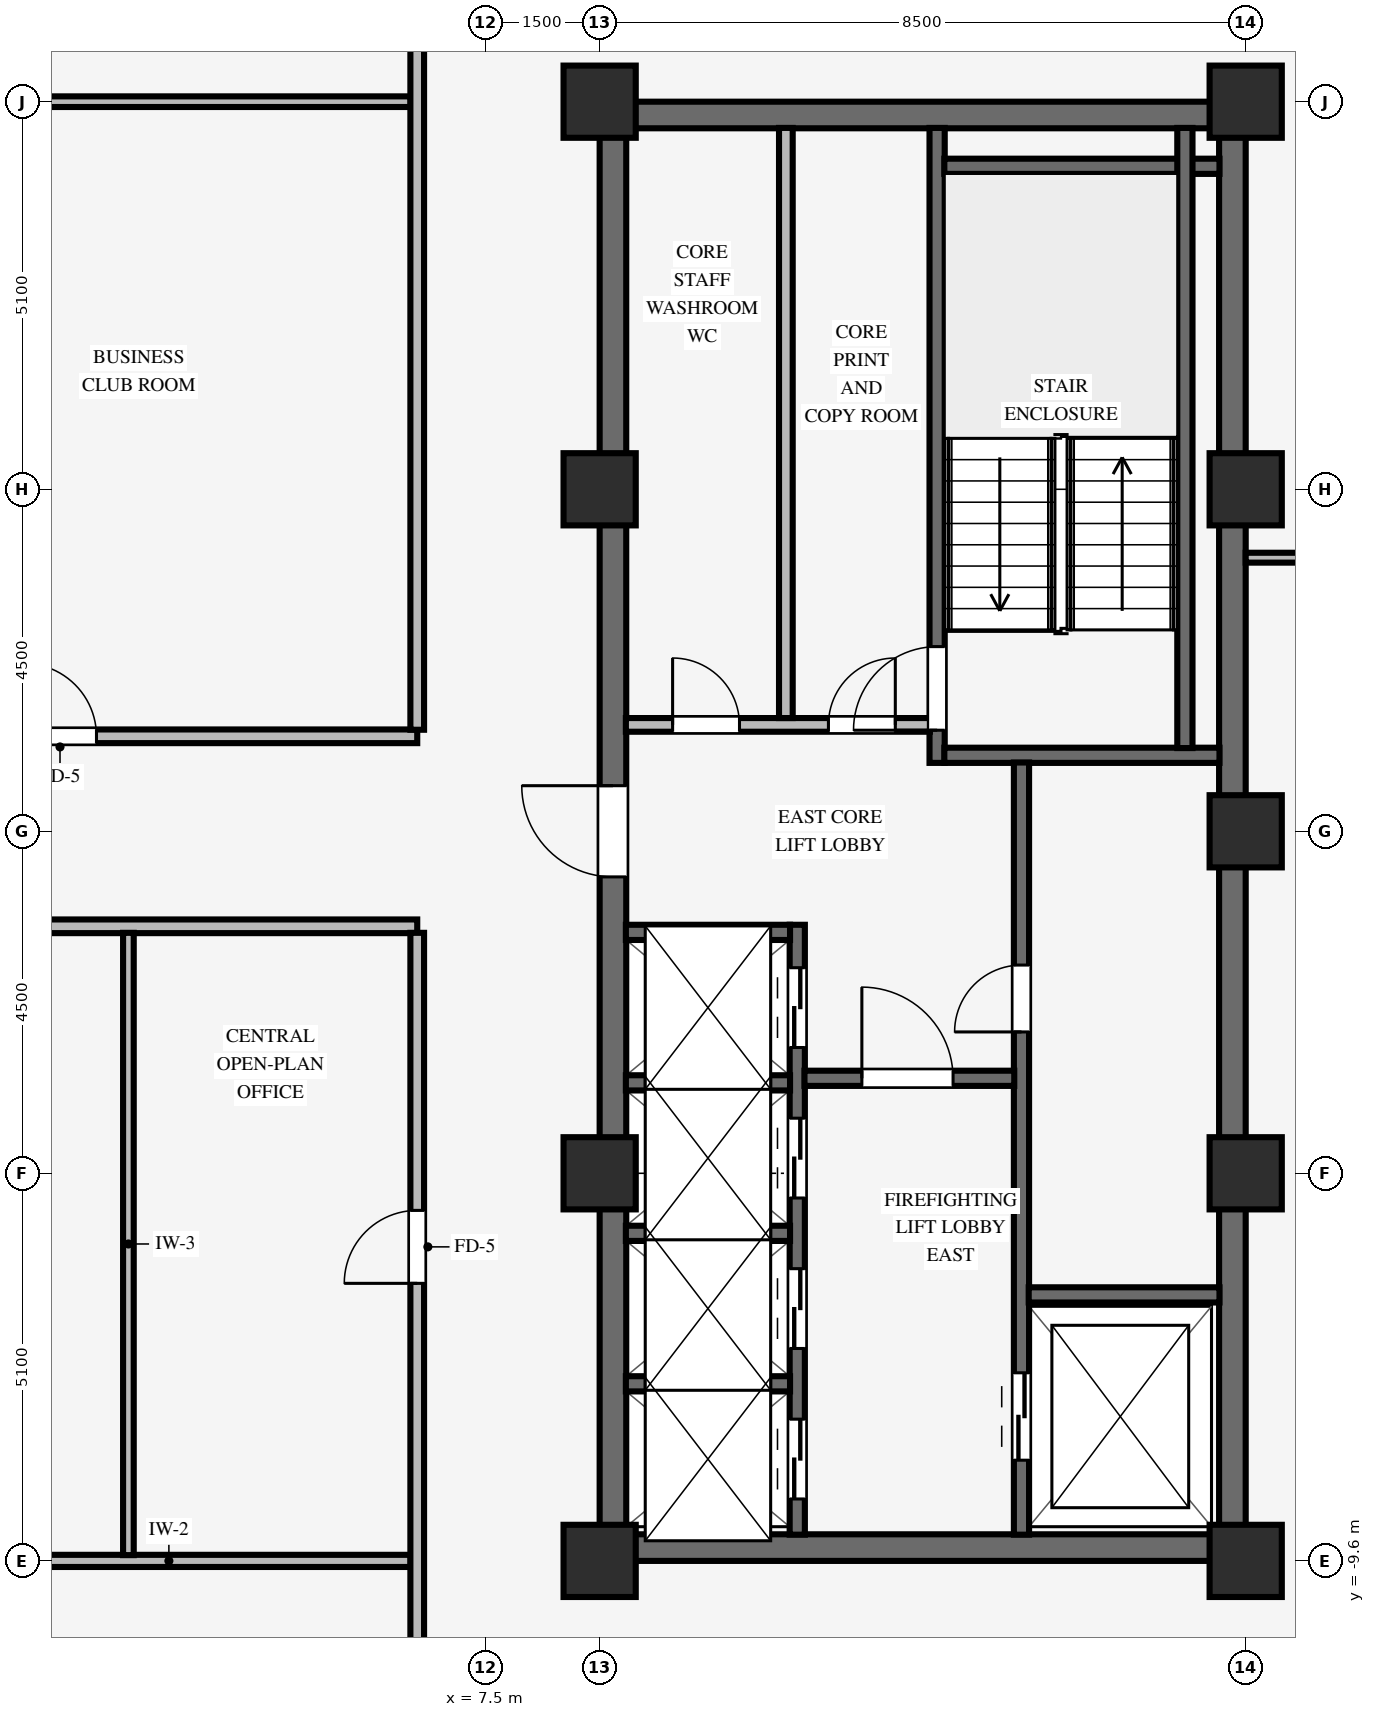
"""IFC4 building model, lengths in metres.
Left out: names, types, materials, properties, quantities, classifications, styles, units other than length and angle.
Written with IfcOpenShell. Run it as: python <this file> out.ifc"""

import sys

from ifc_helpers import new_model, si_unit, direction, frame, frame_2d, origin, origin_2d, place, context, subcontext, project, spatial, rectangle, extrude, source, transform, mapped, element, fill, save


model = new_model("IFC4")
c1 = context("Model", 3, precision=1e-05, world=origin(), true_north=direction((0.0, 1.0)))
c2 = subcontext(c1, "Body", "Model", "MODEL_VIEW")
j1 = project(units=[si_unit("LENGTHUNIT", "METRE"), si_unit("PLANEANGLEUNIT", "RADIAN")], contexts=[c1])
p1 = place(None, origin())
s1 = spatial("IfcSite", under=j1, at=p1, CompositionType="ELEMENT")
p2 = place(p1, origin())
s2 = spatial("IfcBuilding", under=s1, at=p2, CompositionType="ELEMENT")
p3 = place(p2, frame((0.0, 0.0, 190.9)))
s3 = spatial("IfcBuildingStorey", under=s2, at=p3, CompositionType="ELEMENT", Elevation=190.9)
for number, where, z_axis, x_axis in (
    (1, (9.0, -9.425, 0.0), (0.0, 0.0, 1.0), (1.0, 0.0, 0.0)),
    (2, (9.0, 9.425, 0.0), (0.0, 0.0, 1.0), (1.0, 0.0, 0.0)),
):
    element("IfcWall", number, at=place(p3, frame(where, z_axis=z_axis, x_axis=x_axis)), inside=s3, PredefinedType="SHEAR", context=c2, shape_type="SweptSolid", body=[
        extrude(rectangle(XDim=8.5, YDim=0.35, at=frame_2d((4.25, 0.0))), origin(), (0.0, 0.0, 1.0), 3.37),
    ])
p4 = place(p3, frame((9.175, -9.255, 0.0), z_axis=(0.0, 0.0, 1.0), x_axis=(0.0, 1.0, 0.0)))
e3 = element("IfcWall", 3, at=p4, inside=s3, PredefinedType="SHEAR", context=c2, shape_type="SweptSolid", body=[
    extrude(rectangle(XDim=18.51, YDim=0.35, at=frame_2d((9.255, 0.0))), origin(), (0.0, 0.0, 1.0), 3.37),
])
p5 = place(p4, frame((8.655, 0.0, 0.0)))
e4 = element("IfcOpeningElement", 4, at=p5, cuts=e3, PredefinedType="OPENING", context=c2, shape_type="SweptSolid", body=[
    extrude(rectangle(XDim=1.2, YDim=2.15, at=frame_2d((0.6, 1.075))), frame((0.0, 0.185, 0.0), z_axis=(0.0, -1.0, 0.0), x_axis=(1.0, 0.0, 0.0)), (0.0, 0.0, 1.0), 0.37),
])
p6 = place(p3, frame((17.325, -9.255, 0.0), z_axis=(0.0, 0.0, 1.0), x_axis=(0.0, 1.0, 0.0)))
e5 = element("IfcWall", 5, at=p6, inside=s3, PredefinedType="SHEAR", context=c2, shape_type="SweptSolid", body=[
    extrude(rectangle(XDim=18.51, YDim=0.35, at=frame_2d((9.255, 0.0))), origin(), (0.0, 0.0, 1.0), 3.37),
])
for number, where, z_axis, x_axis in (
    (6, (9.0, -9.6, 0.0), (0.0, 0.0, 1.0), (1.0, 0.0, 0.0)),
    (7, (9.0, -4.5, 0.0), (0.0, 0.0, 1.0), (1.0, 0.0, 0.0)),
    (8, (9.0, 4.5, 0.0), (0.0, 0.0, 1.0), (1.0, 0.0, 0.0)),
    (9, (9.0, 9.6, 0.0), (0.0, 0.0, 1.0), (1.0, 0.0, 0.0)),
    (10, (17.5, -9.6, 0.0), (0.0, 0.0, 1.0), (1.0, 0.0, 0.0)),
    (11, (17.5, -4.5, 0.0), (0.0, 0.0, 1.0), (1.0, 0.0, 0.0)),
    (12, (17.5, 4.5, 0.0), (0.0, 0.0, 1.0), (1.0, 0.0, 0.0)),
    (13, (17.5, 9.6, 0.0), (0.0, 0.0, 1.0), (1.0, 0.0, 0.0)),
    (14, (17.5, 0.0, 0.0), (0.0, 0.0, 1.0), (1.0, 0.0, 0.0)),
):
    element("IfcColumn", number, at=place(p3, frame(where, z_axis=z_axis, x_axis=x_axis)), inside=s3, PredefinedType="COLUMN", context=c2, shape_type="SweptSolid", body=[
        extrude(rectangle(XDim=0.95, YDim=0.95, at=origin_2d()), origin(), (0.0, 0.0, 1.0), 3.37),
    ])
p7 = place(p3, frame((13.44, 0.9, 0.0), z_axis=(0.0, 0.0, 1.0), x_axis=(0.0, 1.0, 0.0)))
e15 = element("IfcWall", 15, at=p7, inside=s3, PredefinedType="SHEAR", context=c2, shape_type="SweptSolid", body=[
    extrude(rectangle(XDim=8.355, YDim=0.2, at=frame_2d((4.177, 0.0))), origin(), (0.0, 0.0, 1.0), 3.37),
])
p8 = place(p7, frame((0.43, 0.0, 0.0)))
e16 = element("IfcOpeningElement", 16, at=p8, cuts=e15, PredefinedType="OPENING", context=c2, shape_type="SweptSolid", body=[
    extrude(rectangle(XDim=1.1, YDim=2.15, at=frame_2d((0.55, 1.075))), frame((0.0, 0.11, 0.0), z_axis=(0.0, -1.0, 0.0), x_axis=(1.0, 0.0, 0.0)), (0.0, 0.0, 1.0), 0.22),
])
for number, where, z_axis, x_axis in (
    (17, (13.535, 1.0, 0.0), (0.0, 0.0, 1.0), (1.0, 0.0, 0.0)),
    (18, (13.535, 8.75, 0.0), (0.0, 0.0, 1.0), (1.0, 0.0, 0.0)),
):
    element("IfcWall", number, at=place(p3, frame(where, z_axis=z_axis, x_axis=x_axis)), inside=s3, PredefinedType="SHEAR", context=c2, shape_type="SweptSolid", body=[
        extrude(rectangle(XDim=3.62, YDim=0.2, at=frame_2d((1.81, 0.0))), origin(), (0.0, 0.0, 1.0), 3.37),
    ])
p9 = place(p3, frame((16.7, 1.095, 0.0), z_axis=(0.0, 0.0, 1.0), x_axis=(0.0, 1.0, 0.0)))
e19 = element("IfcWall", 19, at=p9, inside=s3, PredefinedType="SHEAR", context=c2, shape_type="SweptSolid", body=[
    extrude(rectangle(XDim=8.16, YDim=0.2, at=frame_2d((4.08, 0.0))), origin(), (0.0, 0.0, 1.0), 3.37),
])
p10 = place(p3, frame((14.55, -9.255, 0.0), z_axis=(0.0, 0.0, 1.0), x_axis=(0.0, 1.0, 0.0)))
e20 = element("IfcWall", 20, at=p10, inside=s3, PredefinedType="SHEAR", context=c2, shape_type="SweptSolid", body=[
    extrude(rectangle(XDim=10.16, YDim=0.2, at=frame_2d((5.08, 0.0))), origin(), (0.0, 0.0, 1.0), 3.37),
])
p11 = place(p10, frame((6.615, 0.0, 0.0)))
e21 = element("IfcOpeningElement", 21, at=p11, cuts=e20, PredefinedType="OPENING", context=c2, shape_type="SweptSolid", body=[
    extrude(rectangle(XDim=0.88, YDim=2.1, at=frame_2d((0.44, 1.05))), frame((0.0, 0.11, 0.0), z_axis=(0.0, -1.0, 0.0), x_axis=(1.0, 0.0, 0.0)), (0.0, 0.0, 1.0), 0.22),
])
p12 = place(p10, frame((0.98, 0.0, 0.0)))
e22 = element("IfcOpeningElement", 22, at=p12, cuts=e20, PredefinedType="OPENING", context=c2, shape_type="SweptSolid", body=[
    extrude(rectangle(XDim=1.15, YDim=2.15, at=frame_2d((0.575, 1.075))), frame((0.0, 0.11, 0.0), z_axis=(0.0, -1.0, 0.0), x_axis=(1.0, 0.0, 0.0)), (0.0, 0.0, 1.0), 0.22),
])
p13 = place(p3, frame((14.645, -6.1, 0.0), z_axis=(0.0, 0.0, 1.0), x_axis=(1.0, 0.0, 0.0)))
e23 = element("IfcWall", 23, at=p13, inside=s3, PredefinedType="SHEAR", context=c2, shape_type="SweptSolid", body=[
    extrude(rectangle(XDim=2.51, YDim=0.2, at=frame_2d((1.255, 0.0))), origin(), (0.0, 0.0, 1.0), 3.37),
])
p14 = place(p3, frame((11.6, -9.255, 0.0), z_axis=(0.0, 0.0, 1.0), x_axis=(0.0, 1.0, 0.0)))
e24 = element("IfcWall", 24, at=p14, inside=s3, PredefinedType="SHEAR", context=c2, shape_type="SweptSolid", body=[
    extrude(rectangle(XDim=8.025, YDim=0.2, at=frame_2d((4.012, 0.0))), origin(), (0.0, 0.0, 1.0), 3.37),
])
p15 = place(p14, frame((0.47, 0.0, 0.0)))
e25 = element("IfcOpeningElement", 25, at=p15, cuts=e24, PredefinedType="OPENING", context=c2, shape_type="SweptSolid", body=[
    extrude(rectangle(XDim=1.05, YDim=2.15, at=frame_2d((0.525, 1.075))), frame((0.0, 0.11, 0.0), z_axis=(0.0, -1.0, 0.0), x_axis=(1.0, 0.0, 0.0)), (0.0, 0.0, 1.0), 0.22),
])
p16 = place(p14, frame((2.45, 0.0, 0.0)))
e26 = element("IfcOpeningElement", 26, at=p16, cuts=e24, PredefinedType="OPENING", context=c2, shape_type="SweptSolid", body=[
    extrude(rectangle(XDim=1.05, YDim=2.15, at=frame_2d((0.525, 1.075))), frame((0.0, 0.11, 0.0), z_axis=(0.0, -1.0, 0.0), x_axis=(1.0, 0.0, 0.0)), (0.0, 0.0, 1.0), 0.22),
])
p17 = place(p14, frame((4.43, 0.0, 0.0)))
e27 = element("IfcOpeningElement", 27, at=p17, cuts=e24, PredefinedType="OPENING", context=c2, shape_type="SweptSolid", body=[
    extrude(rectangle(XDim=1.05, YDim=2.15, at=frame_2d((0.525, 1.075))), frame((0.0, 0.11, 0.0), z_axis=(0.0, -1.0, 0.0), x_axis=(1.0, 0.0, 0.0)), (0.0, 0.0, 1.0), 0.22),
])
p18 = place(p14, frame((6.41, 0.0, 0.0)))
e28 = element("IfcOpeningElement", 28, at=p18, cuts=e24, PredefinedType="OPENING", context=c2, shape_type="SweptSolid", body=[
    extrude(rectangle(XDim=1.05, YDim=2.15, at=frame_2d((0.525, 1.075))), frame((0.0, 0.11, 0.0), z_axis=(0.0, -1.0, 0.0), x_axis=(1.0, 0.0, 0.0)), (0.0, 0.0, 1.0), 0.22),
])
p19 = place(p3, frame((11.695, -3.25, 0.0), z_axis=(0.0, 0.0, 1.0), x_axis=(1.0, 0.0, 0.0)))
e29 = element("IfcWall", 29, at=p19, inside=s3, PredefinedType="SHEAR", context=c2, shape_type="SweptSolid", body=[
    extrude(rectangle(XDim=2.76, YDim=0.2, at=frame_2d((1.38, 0.0))), origin(), (0.0, 0.0, 1.0), 3.37),
])
p20 = place(p19, frame((0.755, 0.0, 0.0)))
e30 = element("IfcOpeningElement", 30, at=p20, cuts=e29, PredefinedType="OPENING", context=c2, shape_type="SweptSolid", body=[
    extrude(rectangle(XDim=1.2, YDim=2.15, at=frame_2d((0.6, 1.075))), frame((0.0, 0.11, 0.0), z_axis=(0.0, -1.0, 0.0), x_axis=(1.0, 0.0, 0.0)), (0.0, 0.0, 1.0), 0.22),
])
for number, where, z_axis, x_axis in (
    (31, (9.345, -7.27, 0.0), (0.0, 0.0, 1.0), (1.0, 0.0, 0.0)),
    (32, (9.345, -5.29, 0.0), (0.0, 0.0, 1.0), (1.0, 0.0, 0.0)),
    (33, (9.345, -3.31, 0.0), (0.0, 0.0, 1.0), (1.0, 0.0, 0.0)),
    (34, (9.345, -1.33, 0.0), (0.0, 0.0, 1.0), (1.0, 0.0, 0.0)),
):
    element("IfcWall", number, at=place(p3, frame(where, z_axis=z_axis, x_axis=x_axis)), inside=s3, PredefinedType="SHEAR", context=c2, shape_type="SweptSolid", body=[
        extrude(rectangle(XDim=2.16, YDim=0.2, at=frame_2d((1.08, 0.0))), origin(), (0.0, 0.0, 1.0), 3.37),
    ])
p21 = place(p3, frame((9.345, 1.4, 0.0), z_axis=(0.0, 0.0, 1.0), x_axis=(1.0, 0.0, 0.0)))
e35 = element("IfcWall", 35, at=p21, inside=s3, PredefinedType="PARTITIONING", context=c2, shape_type="SweptSolid", body=[
    extrude(rectangle(XDim=4.0, YDim=0.18, at=frame_2d((2.0, 0.0))), origin(), (0.0, 0.0, 1.0), 3.36),
])
p22 = place(p21, frame((0.615, 0.0, 0.0)))
e36 = element("IfcOpeningElement", 36, at=p22, cuts=e35, PredefinedType="OPENING", context=c2, shape_type="SweptSolid", body=[
    extrude(rectangle(XDim=0.88, YDim=2.1, at=frame_2d((0.44, 1.05))), frame((0.0, 0.1, 0.0), z_axis=(0.0, -1.0, 0.0), x_axis=(1.0, 0.0, 0.0)), (0.0, 0.0, 1.0), 0.2),
])
p23 = place(p21, frame((2.665, 0.0, 0.0)))
e37 = element("IfcOpeningElement", 37, at=p23, cuts=e35, PredefinedType="OPENING", context=c2, shape_type="SweptSolid", body=[
    extrude(rectangle(XDim=0.88, YDim=2.1, at=frame_2d((0.44, 1.05))), frame((0.0, 0.1, 0.0), z_axis=(0.0, -1.0, 0.0), x_axis=(1.0, 0.0, 0.0)), (0.0, 0.0, 1.0), 0.2),
])
p24 = place(p3, frame((11.45, 1.49, 0.0), z_axis=(0.0, 0.0, 1.0), x_axis=(0.0, 1.0, 0.0)))
e38 = element("IfcWall", 38, at=p24, inside=s3, PredefinedType="PARTITIONING", context=c2, shape_type="SweptSolid", body=[
    extrude(rectangle(XDim=7.765, YDim=0.18, at=frame_2d((3.882, 0.0))), origin(), (0.0, 0.0, 1.0), 3.36),
])
p25 = place(p3, frame((0.151, -9.6, 0.0), z_axis=(0.0, 0.0, 1.0), x_axis=(1.0, 0.0, 0.0)))
e39 = element("IfcWall", 39, at=p25, inside=s3, PredefinedType="PARTITIONING", context=c2, shape_type="SweptSolid", body=[
    extrude(rectangle(XDim=6.363, YDim=0.16, at=frame_2d((3.182, 0.0))), origin(), (0.0, 0.0, 1.0), 2.405),
])
p26 = place(p3, frame((-9.0, -1.25, 0.0), z_axis=(0.0, 0.0, 1.0), x_axis=(1.0, 0.0, 0.0)))
e40 = element("IfcWall", 40, at=p26, inside=s3, PredefinedType="PARTITIONING", context=c2, shape_type="SweptSolid", body=[
    extrude(rectangle(XDim=15.6, YDim=0.18, at=frame_2d((7.8, 0.0))), origin(), (0.0, 0.0, 1.0), 3.36),
])
p27 = place(p26, frame((5.42, 0.0, 0.0)))
e41 = element("IfcOpeningElement", 41, at=p27, cuts=e40, PredefinedType="OPENING", context=c2, shape_type="SweptSolid", body=[
    extrude(rectangle(XDim=0.96, YDim=2.1, at=frame_2d((0.48, 1.05))), frame((0.0, 0.1, 0.0), z_axis=(0.0, -1.0, 0.0), x_axis=(1.0, 0.0, 0.0)), (0.0, 0.0, 1.0), 0.2),
])
p28 = place(p3, frame((-9.0, 1.25, 0.0), z_axis=(0.0, 0.0, 1.0), x_axis=(1.0, 0.0, 0.0)))
e42 = element("IfcWall", 42, at=p28, inside=s3, PredefinedType="PARTITIONING", context=c2, shape_type="SweptSolid", body=[
    extrude(rectangle(XDim=15.6, YDim=0.18, at=frame_2d((7.8, 0.0))), origin(), (0.0, 0.0, 1.0), 3.36),
])
p29 = place(p28, frame((10.42, 0.0, 0.0)))
e43 = element("IfcOpeningElement", 43, at=p29, cuts=e42, PredefinedType="OPENING", context=c2, shape_type="SweptSolid", body=[
    extrude(rectangle(XDim=0.96, YDim=2.1, at=frame_2d((0.48, 1.05))), frame((0.0, 0.1, 0.0), z_axis=(0.0, -1.0, 0.0), x_axis=(1.0, 0.0, 0.0)), (0.0, 0.0, 1.0), 0.2),
])
p30 = place(p28, frame((2.62, 0.0, 0.0)))
e44 = element("IfcOpeningElement", 44, at=p30, cuts=e42, PredefinedType="OPENING", context=c2, shape_type="SweptSolid", body=[
    extrude(rectangle(XDim=0.96, YDim=2.1, at=frame_2d((0.48, 1.05))), frame((0.0, 0.1, 0.0), z_axis=(0.0, -1.0, 0.0), x_axis=(1.0, 0.0, 0.0)), (0.0, 0.0, 1.0), 0.2),
])
p31 = place(p3, frame((17.5, 3.6, 0.0), z_axis=(0.0, 0.0, 1.0), x_axis=(1.0, 0.0, 0.0)))
e45 = element("IfcWall", 45, at=p31, inside=s3, PredefinedType="PARTITIONING", context=c2, shape_type="SweptSolid", body=[
    extrude(rectangle(XDim=4.79, YDim=0.13, at=frame_2d((2.395, 0.0))), origin(), (0.0, 0.0, 1.0), 3.36),
])
p32 = place(p3, frame((0.151, 9.6, 0.0), z_axis=(0.0, 0.0, 1.0), x_axis=(1.0, 0.0, 0.0)))
e46 = element("IfcWall", 46, at=p32, inside=s3, PredefinedType="PARTITIONING", context=c2, shape_type="SweptSolid", body=[
    extrude(rectangle(XDim=6.363, YDim=0.14, at=frame_2d((3.182, 0.0))), origin(), (0.0, 0.0, 1.0), 2.405),
])
p33 = place(p3, frame((2.8, -9.524, 0.0), z_axis=(0.0, 0.0, 1.0), x_axis=(0.0, 1.0, 0.0)))
e47 = element("IfcWall", 47, at=p33, inside=s3, PredefinedType="PARTITIONING", context=c2, shape_type="SweptSolid", body=[
    extrude(rectangle(XDim=8.188, YDim=0.14, at=frame_2d((4.094, 0.0))), origin(), (0.0, 0.0, 1.0), 3.36),
])
p34 = place(p3, frame((6.6, -13.414, 0.0), z_axis=(0.0, 0.0, 1.0), x_axis=(0.0, 1.0, 0.0)))
e48 = element("IfcWall", 48, at=p34, inside=s3, PredefinedType="PARTITIONING", context=c2, shape_type="SweptSolid", body=[
    extrude(rectangle(XDim=12.078, YDim=0.18, at=frame_2d((6.039, 0.0))), origin(), (0.0, 0.0, 1.0), 3.36),
])
p35 = place(p34, frame((7.466, 0.0, 0.0)))
e49 = element("IfcOpeningElement", 49, at=p35, cuts=e48, PredefinedType="OPENING", context=c2, shape_type="SweptSolid", body=[
    extrude(rectangle(XDim=0.96, YDim=2.1, at=frame_2d((0.48, 1.05))), frame((0.0, 0.1, 0.0), z_axis=(0.0, -1.0, 0.0), x_axis=(1.0, 0.0, 0.0)), (0.0, 0.0, 1.0), 0.2),
])
p36 = place(p3, frame((6.6, 1.336, 0.0), z_axis=(0.0, 0.0, 1.0), x_axis=(0.0, 1.0, 0.0)))
e50 = element("IfcWall", 50, at=p36, inside=s3, PredefinedType="PARTITIONING", context=c2, shape_type="SweptSolid", body=[
    extrude(rectangle(XDim=12.078, YDim=0.18, at=frame_2d((6.039, 0.0))), origin(), (0.0, 0.0, 1.0), 3.36),
])
m1 = source(origin(), c2, "Body", "SweptSolid", [
    extrude(rectangle(XDim=1.1, YDim=2.15, at=frame_2d((0.55, 1.075))), frame((0.0, 0.025, 0.0), z_axis=(0.0, -1.0, 0.0), x_axis=(1.0, 0.0, 0.0)), (0.0, 0.0, 1.0), 0.05),
])
p37 = place(p8, origin())
e51 = element("IfcDoor", 51, at=p37, inside=s3, OperationType="SINGLE_SWING_LEFT", PredefinedType="DOOR", context=c2, shape_type="MappedRepresentation", body=[
    mapped(m1, transform((0.0, 0.0, 0.0), scale=1.0)),
])
fill(e16, e51)
m2 = source(origin(), c2, "Body", "SweptSolid", [
    extrude(rectangle(XDim=0.88, YDim=2.1, at=frame_2d((0.44, 1.05))), frame((0.0, 0.025, 0.0), z_axis=(0.0, -1.0, 0.0), x_axis=(1.0, 0.0, 0.0)), (0.0, 0.0, 1.0), 0.05),
])
p38 = place(p11, origin())
e52 = element("IfcDoor", 52, at=p38, inside=s3, OperationType="SINGLE_SWING_LEFT", PredefinedType="DOOR", context=c2, shape_type="MappedRepresentation", body=[
    mapped(m2, transform((0.0, 0.0, 0.0), scale=1.0)),
])
fill(e21, e52)
m3 = source(origin(), c2, "Body", "SweptSolid", [
    extrude(rectangle(XDim=1.2, YDim=2.15, at=frame_2d((0.6, 1.075))), frame((0.0, 0.025, 0.0), z_axis=(0.0, -1.0, 0.0), x_axis=(1.0, 0.0, 0.0)), (0.0, 0.0, 1.0), 0.05),
])
p39 = place(p20, origin())
e53 = element("IfcDoor", 53, at=p39, inside=s3, OperationType="SINGLE_SWING_LEFT", PredefinedType="DOOR", context=c2, shape_type="MappedRepresentation", body=[
    mapped(m3, transform((0.0, 0.0, 0.0), scale=1.0)),
])
fill(e30, e53)
p40 = place(p5, origin())
e54 = element("IfcDoor", 54, at=p40, inside=s3, OperationType="SINGLE_SWING_RIGHT", PredefinedType="DOOR", context=c2, shape_type="MappedRepresentation", body=[
    mapped(m3, transform((0.0, 0.0, 0.0), scale=1.0)),
])
fill(e4, e54)
p41 = place(p22, origin())
e55 = element("IfcDoor", 55, at=p41, inside=s3, OperationType="SINGLE_SWING_LEFT", PredefinedType="DOOR", context=c2, shape_type="MappedRepresentation", body=[
    mapped(m2, transform((0.0, 0.0, 0.0), scale=1.0)),
])
fill(e36, e55)
p42 = place(p23, origin())
e56 = element("IfcDoor", 56, at=p42, inside=s3, OperationType="SINGLE_SWING_RIGHT", PredefinedType="DOOR", context=c2, shape_type="MappedRepresentation", body=[
    mapped(m2, transform((0.0, 0.0, 0.0), scale=1.0)),
])
fill(e37, e56)
m4 = source(origin(), c2, "Body", "SweptSolid", [
    extrude(rectangle(XDim=1.15, YDim=2.15, at=frame_2d((0.575, 1.075))), frame((0.0, 0.025, 0.0), z_axis=(0.0, -1.0, 0.0), x_axis=(1.0, 0.0, 0.0)), (0.0, 0.0, 1.0), 0.05),
])
p43 = place(p12, origin())
e57 = element("IfcDoor", 57, at=p43, inside=s3, OperationType="DOUBLE_DOOR_SLIDING", PredefinedType="DOOR", context=c2, shape_type="MappedRepresentation", body=[
    mapped(m4, transform((0.0, 0.0, 0.0), scale=1.0)),
])
fill(e22, e57)
m5 = source(origin(), c2, "Body", "SweptSolid", [
    extrude(rectangle(XDim=1.05, YDim=2.15, at=frame_2d((0.525, 1.075))), frame((0.0, 0.025, 0.0), z_axis=(0.0, -1.0, 0.0), x_axis=(1.0, 0.0, 0.0)), (0.0, 0.0, 1.0), 0.05),
])
p44 = place(p15, origin())
e58 = element("IfcDoor", 58, at=p44, inside=s3, OperationType="DOUBLE_DOOR_SLIDING", PredefinedType="DOOR", context=c2, shape_type="MappedRepresentation", body=[
    mapped(m5, transform((0.0, 0.0, 0.0), scale=1.0)),
])
fill(e25, e58)
p45 = place(p16, origin())
e59 = element("IfcDoor", 59, at=p45, inside=s3, OperationType="DOUBLE_DOOR_SLIDING", PredefinedType="DOOR", context=c2, shape_type="MappedRepresentation", body=[
    mapped(m5, transform((0.0, 0.0, 0.0), scale=1.0)),
])
fill(e26, e59)
p46 = place(p17, origin())
e60 = element("IfcDoor", 60, at=p46, inside=s3, OperationType="DOUBLE_DOOR_SLIDING", PredefinedType="DOOR", context=c2, shape_type="MappedRepresentation", body=[
    mapped(m5, transform((0.0, 0.0, 0.0), scale=1.0)),
])
fill(e27, e60)
p47 = place(p18, origin())
e61 = element("IfcDoor", 61, at=p47, inside=s3, OperationType="DOUBLE_DOOR_SLIDING", PredefinedType="DOOR", context=c2, shape_type="MappedRepresentation", body=[
    mapped(m5, transform((0.0, 0.0, 0.0), scale=1.0)),
])
fill(e28, e61)
m6 = source(origin(), c2, "Body", "SweptSolid", [
    extrude(rectangle(XDim=0.96, YDim=2.1, at=frame_2d((0.48, 1.05))), frame((0.0, 0.025, 0.0), z_axis=(0.0, -1.0, 0.0), x_axis=(1.0, 0.0, 0.0)), (0.0, 0.0, 1.0), 0.05),
])
p48 = place(p29, origin())
e62 = element("IfcDoor", 62, at=p48, inside=s3, OperationType="SINGLE_SWING_LEFT", PredefinedType="DOOR", context=c2, shape_type="MappedRepresentation", body=[
    mapped(m6, transform((0.0, 0.0, 0.0), scale=1.0)),
])
fill(e43, e62)
p49 = place(p35, origin())
e63 = element("IfcDoor", 63, at=p49, inside=s3, OperationType="SINGLE_SWING_LEFT", PredefinedType="DOOR", context=c2, shape_type="MappedRepresentation", body=[
    mapped(m6, transform((0.0, 0.0, 0.0), scale=1.0)),
])
fill(e49, e63)
save(model, sys.argv[1])
